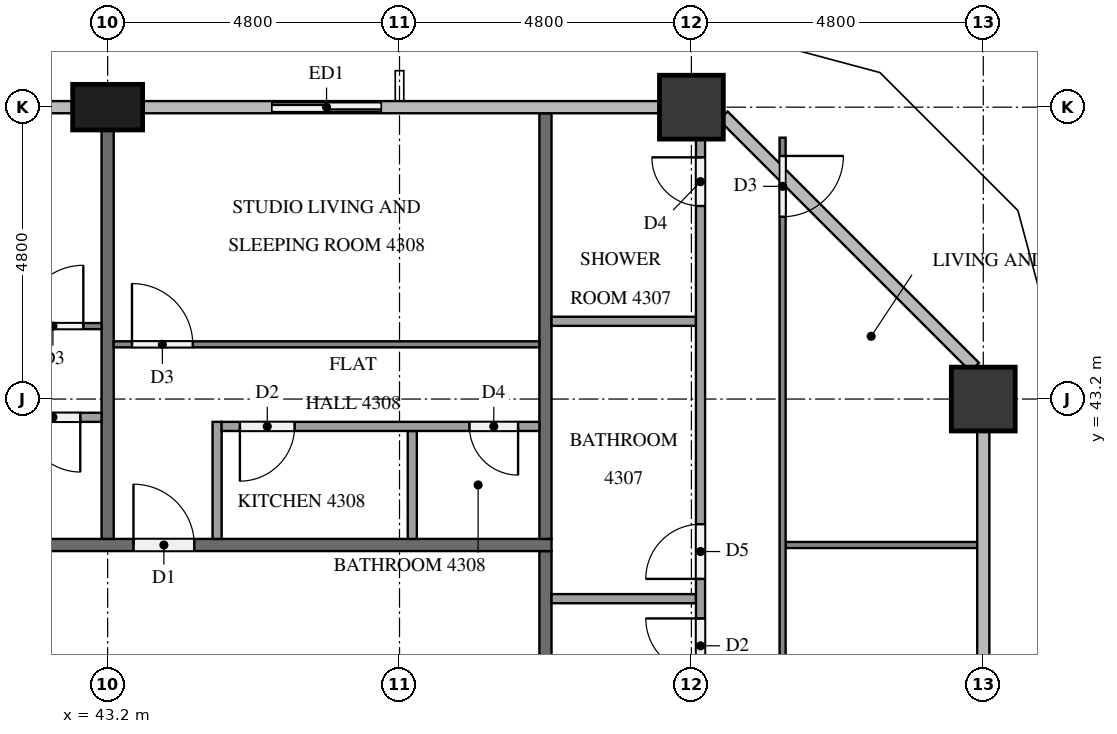
"""IFC4 building model, lengths in metres.
Left out: names, types, materials, properties, quantities, classifications, styles, units other than length and angle.
Written with IfcOpenShell. Run it as: python <this file> out.ifc"""

import sys

from ifc_helpers import new_model, si_unit, direction, frame, frame_2d, origin, origin_2d, place, context, subcontext, project, spatial, rectangle, extrude, element, fill, save


model = new_model("IFC4")
c1 = context("Model", 3, precision=1e-05, world=origin(), true_north=direction((0.0, 1.0)))
c2 = subcontext(c1, "Body", "Model", "MODEL_VIEW")
j1 = project(units=[si_unit("LENGTHUNIT", "METRE"), si_unit("PLANEANGLEUNIT", "RADIAN")], contexts=[c1])
p1 = place(None, origin())
s1 = spatial("IfcSite", under=j1, at=p1, CompositionType="ELEMENT")
p2 = place(p1, origin())
s2 = spatial("IfcBuilding", under=s1, at=p2, CompositionType="ELEMENT")
p3 = place(p2, frame((0.0, 0.0, 166.5)))
s3 = spatial("IfcBuildingStorey", under=s2, at=p3, CompositionType="ELEMENT", Elevation=166.5)
for number, where, z_axis, x_axis in (
    (1, (57.6, 43.2, 0.0), (0.0, 0.0, 1.0), (1.0, 0.0, 0.0)),
    (2, (52.8, 48.0, 0.0), (0.0, 0.0, 1.0), (1.0, 0.0, 0.0)),
):
    element("IfcColumn", number, at=place(p3, frame(where, z_axis=z_axis, x_axis=x_axis)), inside=s3, PredefinedType="COLUMN", context=c2, shape_type="SweptSolid", body=[
        extrude(rectangle(XDim=1.05, YDim=1.05, at=origin_2d()), origin(), (0.0, 0.0, 1.0), 3.2),
    ])
p4 = place(p3, frame((43.2, 48.0, 0.0), z_axis=(0.0, 0.0, 1.0), x_axis=(1.0, 0.0, 0.0)))
e3 = element("IfcColumn", 3, at=p4, inside=s3, PredefinedType="COLUMN", context=c2, shape_type="SweptSolid", body=[
    extrude(rectangle(XDim=1.15, YDim=0.75, at=origin_2d()), origin(), (0.0, 0.0, 1.0), 3.2),
])
p5 = place(p3, frame((48.0, 48.0, 0.0), z_axis=(0.0, 0.0, 1.0), x_axis=(-1.0, 0.0, 0.0)))
e4 = element("IfcWall", 4, at=p5, inside=s3, PredefinedType="SOLIDWALL", context=c2, shape_type="SweptSolid", body=[
    extrude(rectangle(XDim=2.4, YDim=0.15, at=frame_2d((1.2, 0.0))), origin(), (0.0, 0.0, 1.0), 3.2),
])
p6 = place(p5, frame((0.3, 0.0, 0.0)))
e5 = element("IfcOpeningElement", 5, at=p6, cuts=e4, PredefinedType="OPENING", context=c2, shape_type="SweptSolid", body=[
    extrude(rectangle(XDim=1.8, YDim=2.4, at=frame_2d((0.9, 1.2))), frame((0.0, 0.085, 0.0), z_axis=(0.0, -1.0, 0.0), x_axis=(1.0, 0.0, 0.0)), (0.0, 0.0, 1.0), 0.17),
])
p7 = place(p3, frame((50.4, 40.7, 0.0), z_axis=(0.0, 0.0, 1.0), x_axis=(0.0, -1.0, 0.0)))
e6 = element("IfcWall", 6, at=p7, inside=s3, PredefinedType="PARTITIONING", context=c2, shape_type="SweptSolid", body=[
    extrude(rectangle(XDim=28.6, YDim=0.2, at=frame_2d((14.3, 0.0))), origin(), (0.0, 0.0, 1.0), 3.2),
])
p8 = place(p7, frame((19.525, 0.0, 0.0)))
e7 = element("IfcOpeningElement", 7, at=p8, cuts=e6, PredefinedType="OPENING", context=c2, shape_type="SweptSolid", body=[
    extrude(rectangle(XDim=1.0, YDim=2.1, at=frame_2d((0.5, 1.05))), frame((0.0, 0.11, 0.0), z_axis=(0.0, -1.0, 0.0), x_axis=(1.0, 0.0, 0.0)), (0.0, 0.0, 1.0), 0.22),
])
p9 = place(p7, frame((17.675, 0.0, 0.0)))
e8 = element("IfcOpeningElement", 8, at=p9, cuts=e6, PredefinedType="OPENING", context=c2, shape_type="SweptSolid", body=[
    extrude(rectangle(XDim=1.0, YDim=2.1, at=frame_2d((0.5, 1.05))), frame((0.0, 0.11, 0.0), z_axis=(0.0, -1.0, 0.0), x_axis=(1.0, 0.0, 0.0)), (0.0, 0.0, 1.0), 0.22),
])
p10 = place(p7, frame((8.075, 0.0, 0.0)))
e9 = element("IfcOpeningElement", 9, at=p10, cuts=e6, PredefinedType="OPENING", context=c2, shape_type="SweptSolid", body=[
    extrude(rectangle(XDim=1.0, YDim=2.1, at=frame_2d((0.5, 1.05))), frame((0.0, 0.11, 0.0), z_axis=(0.0, -1.0, 0.0), x_axis=(1.0, 0.0, 0.0)), (0.0, 0.0, 1.0), 0.22),
])
p11 = place(p3, frame((11.9, 40.8, 0.0), z_axis=(0.0, 0.0, 1.0), x_axis=(1.0, 0.0, 0.0)))
e10 = element("IfcWall", 10, at=p11, inside=s3, PredefinedType="PARTITIONING", context=c2, shape_type="SweptSolid", body=[
    extrude(rectangle(XDim=38.6, YDim=0.2, at=frame_2d((19.3, 0.0))), origin(), (0.0, 0.0, 1.0), 3.2),
])
p12 = place(p11, frame((31.725, 0.0, 0.0)))
e11 = element("IfcOpeningElement", 11, at=p12, cuts=e10, PredefinedType="OPENING", context=c2, shape_type="SweptSolid", body=[
    extrude(rectangle(XDim=1.0, YDim=2.1, at=frame_2d((0.5, 1.05))), frame((0.0, 0.11, 0.0), z_axis=(0.0, -1.0, 0.0), x_axis=(1.0, 0.0, 0.0)), (0.0, 0.0, 1.0), 0.22),
])
p13 = place(p11, frame((17.325, 0.0, 0.0)))
e12 = element("IfcOpeningElement", 12, at=p13, cuts=e10, PredefinedType="OPENING", context=c2, shape_type="SweptSolid", body=[
    extrude(rectangle(XDim=1.0, YDim=2.1, at=frame_2d((0.5, 1.05))), frame((0.0, 0.11, 0.0), z_axis=(0.0, -1.0, 0.0), x_axis=(1.0, 0.0, 0.0)), (0.0, 0.0, 1.0), 0.22),
])
p14 = place(p11, frame((0.525, 0.0, 0.0)))
e13 = element("IfcOpeningElement", 13, at=p14, cuts=e10, PredefinedType="OPENING", context=c2, shape_type="SweptSolid", body=[
    extrude(rectangle(XDim=1.0, YDim=2.1, at=frame_2d((0.5, 1.05))), frame((0.0, 0.11, 0.0), z_axis=(0.0, -1.0, 0.0), x_axis=(1.0, 0.0, 0.0)), (0.0, 0.0, 1.0), 0.22),
])
p15 = place(p3, frame((50.4, 40.9, 0.0), z_axis=(0.0, 0.0, 1.0), x_axis=(0.0, 1.0, 0.0)))
e14 = element("IfcWall", 14, at=p15, inside=s3, PredefinedType="PARTITIONING", context=c2, shape_type="SweptSolid", body=[
    extrude(rectangle(XDim=7.0, YDim=0.2, at=frame_2d((3.5, 0.0))), origin(), (0.0, 0.0, 1.0), 3.2),
])
p16 = place(p3, frame((43.2, 47.625, 0.0), z_axis=(0.0, 0.0, 1.0), x_axis=(0.0, -1.0, 0.0)))
e15 = element("IfcWall", 15, at=p16, inside=s3, PredefinedType="PARTITIONING", context=c2, shape_type="SweptSolid", body=[
    extrude(rectangle(XDim=6.725, YDim=0.2, at=frame_2d((3.363, 0.0))), origin(), (0.0, 0.0, 1.0), 3.2),
])
p17 = place(p3, frame((54.35, 40.8, 0.0), z_axis=(0.0, 0.0, 1.0), x_axis=(1.0, 0.0, 0.0)))
e16 = element("IfcWall", 16, at=p17, inside=s3, PredefinedType="PARTITIONING", context=c2, shape_type="SweptSolid", body=[
    extrude(rectangle(XDim=3.15, YDim=0.1, at=frame_2d((1.575, 0.0))), origin(), (0.0, 0.0, 1.0), 3.2),
])
p18 = place(p3, frame((54.3, 47.498, 0.0), z_axis=(0.0, 0.0, 1.0), x_axis=(0.0, -1.0, 0.0)))
e17 = element("IfcWall", 17, at=p18, inside=s3, PredefinedType="PARTITIONING", context=c2, shape_type="SweptSolid", body=[
    extrude(rectangle(XDim=16.198, YDim=0.1, at=frame_2d((8.099, 0.0))), origin(), (0.0, 0.0, 1.0), 3.2),
])
p19 = place(p18, frame((11.848, 0.0, 0.0)))
e18 = element("IfcOpeningElement", 18, at=p19, cuts=e17, PredefinedType="OPENING", context=c2, shape_type="SweptSolid", body=[
    extrude(rectangle(XDim=0.9, YDim=2.1, at=frame_2d((0.45, 1.05))), frame((0.0, 0.06, 0.0), z_axis=(0.0, -1.0, 0.0), x_axis=(1.0, 0.0, 0.0)), (0.0, 0.0, 1.0), 0.12),
])
p20 = place(p18, frame((10.248, 0.0, 0.0)))
e19 = element("IfcOpeningElement", 19, at=p20, cuts=e17, PredefinedType="OPENING", context=c2, shape_type="SweptSolid", body=[
    extrude(rectangle(XDim=0.9, YDim=2.1, at=frame_2d((0.45, 1.05))), frame((0.0, 0.06, 0.0), z_axis=(0.0, -1.0, 0.0), x_axis=(1.0, 0.0, 0.0)), (0.0, 0.0, 1.0), 0.12),
])
p21 = place(p18, frame((0.3, 0.0, 0.0)))
e20 = element("IfcOpeningElement", 20, at=p21, cuts=e17, PredefinedType="OPENING", context=c2, shape_type="SweptSolid", body=[
    extrude(rectangle(XDim=1.0, YDim=2.1, at=frame_2d((0.5, 1.05))), frame((0.0, 0.06, 0.0), z_axis=(0.0, -1.0, 0.0), x_axis=(1.0, 0.0, 0.0)), (0.0, 0.0, 1.0), 0.12),
])
for number, where, z_axis, x_axis in (
    (21, (50.5, 39.917, 0.0), (0.0, 0.0, 1.0), (1.0, 0.0, 0.0)),
    (22, (50.5, 44.479, 0.0), (0.0, 0.0, 1.0), (1.0, 0.0, 0.0)),
):
    element("IfcWall", number, at=place(p3, frame(where, z_axis=z_axis, x_axis=x_axis)), inside=s3, PredefinedType="PARTITIONING", context=c2, shape_type="SweptSolid", body=[
        extrude(rectangle(XDim=2.375, YDim=0.15, at=frame_2d((1.188, 0.0))), origin(), (0.0, 0.0, 1.0), 3.2),
    ])
p22 = place(p3, frame((52.95, 33.075, 0.0), z_axis=(0.0, 0.0, 1.0), x_axis=(0.0, 1.0, 0.0)))
e23 = element("IfcWall", 23, at=p22, inside=s3, PredefinedType="PARTITIONING", context=c2, shape_type="SweptSolid", body=[
    extrude(rectangle(XDim=14.4, YDim=0.15, at=frame_2d((7.2, 0.0))), origin(), (0.0, 0.0, 1.0), 3.2),
])
p23 = place(p22, frame((5.617, 0.0, 0.0)))
e24 = element("IfcOpeningElement", 24, at=p23, cuts=e23, PredefinedType="OPENING", context=c2, shape_type="SweptSolid", body=[
    extrude(rectangle(XDim=0.9, YDim=2.1, at=frame_2d((0.45, 1.05))), frame((0.0, 0.085, 0.0), z_axis=(0.0, -1.0, 0.0), x_axis=(1.0, 0.0, 0.0)), (0.0, 0.0, 1.0), 0.17),
])
p24 = place(p22, frame((7.167, 0.0, 0.0)))
e25 = element("IfcOpeningElement", 25, at=p24, cuts=e23, PredefinedType="OPENING", context=c2, shape_type="SweptSolid", body=[
    extrude(rectangle(XDim=0.9, YDim=2.1, at=frame_2d((0.45, 1.05))), frame((0.0, 0.085, 0.0), z_axis=(0.0, -1.0, 0.0), x_axis=(1.0, 0.0, 0.0)), (0.0, 0.0, 1.0), 0.17),
])
p25 = place(p22, frame((13.3, 0.0, 0.0)))
e26 = element("IfcOpeningElement", 26, at=p25, cuts=e23, PredefinedType="OPENING", context=c2, shape_type="SweptSolid", body=[
    extrude(rectangle(XDim=0.8, YDim=2.1, at=frame_2d((0.4, 1.05))), frame((0.0, 0.085, 0.0), z_axis=(0.0, -1.0, 0.0), x_axis=(1.0, 0.0, 0.0)), (0.0, 0.0, 1.0), 0.17),
])
p26 = place(p3, frame((43.3, 44.1, 0.0), z_axis=(0.0, 0.0, 1.0), x_axis=(1.0, 0.0, 0.0)))
e27 = element("IfcWall", 27, at=p26, inside=s3, PredefinedType="PARTITIONING", context=c2, shape_type="SweptSolid", body=[
    extrude(rectangle(XDim=7.0, YDim=0.1, at=frame_2d((3.5, 0.0))), origin(), (0.0, 0.0, 1.0), 3.2),
])
p27 = place(p26, frame((0.3, 0.0, 0.0)))
e28 = element("IfcOpeningElement", 28, at=p27, cuts=e27, PredefinedType="OPENING", context=c2, shape_type="SweptSolid", body=[
    extrude(rectangle(XDim=1.0, YDim=2.1, at=frame_2d((0.5, 1.05))), frame((0.0, 0.06, 0.0), z_axis=(0.0, -1.0, 0.0), x_axis=(1.0, 0.0, 0.0)), (0.0, 0.0, 1.0), 0.12),
])
p28 = place(p3, frame((48.21, 40.9, 0.0), z_axis=(0.0, 0.0, 1.0), x_axis=(0.0, 1.0, 0.0)))
e29 = element("IfcWall", 29, at=p28, inside=s3, PredefinedType="PARTITIONING", context=c2, shape_type="SweptSolid", body=[
    extrude(rectangle(XDim=1.775, YDim=0.15, at=frame_2d((0.888, 0.0))), origin(), (0.0, 0.0, 1.0), 3.2),
])
p29 = place(p3, frame((45.0, 40.9, 0.0), z_axis=(0.0, 0.0, 1.0), x_axis=(0.0, 1.0, 0.0)))
e30 = element("IfcWall", 30, at=p29, inside=s3, PredefinedType="PARTITIONING", context=c2, shape_type="SweptSolid", body=[
    extrude(rectangle(XDim=1.925, YDim=0.15, at=frame_2d((0.962, 0.0))), origin(), (0.0, 0.0, 1.0), 3.2),
])
p30 = place(p3, frame((50.3, 42.75, 0.0), z_axis=(0.0, 0.0, 1.0), x_axis=(-1.0, 0.0, 0.0)))
e31 = element("IfcWall", 31, at=p30, inside=s3, PredefinedType="PARTITIONING", context=c2, shape_type="SweptSolid", body=[
    extrude(rectangle(XDim=5.225, YDim=0.15, at=frame_2d((2.613, 0.0))), origin(), (0.0, 0.0, 1.0), 3.2),
])
p31 = place(p30, frame((4.025, 0.0, 0.0)))
e32 = element("IfcOpeningElement", 32, at=p31, cuts=e31, PredefinedType="OPENING", context=c2, shape_type="SweptSolid", body=[
    extrude(rectangle(XDim=0.9, YDim=2.1, at=frame_2d((0.45, 1.05))), frame((0.0, 0.085, 0.0), z_axis=(0.0, -1.0, 0.0), x_axis=(1.0, 0.0, 0.0)), (0.0, 0.0, 1.0), 0.17),
])
p32 = place(p30, frame((0.35, 0.0, 0.0)))
e33 = element("IfcOpeningElement", 33, at=p32, cuts=e31, PredefinedType="OPENING", context=c2, shape_type="SweptSolid", body=[
    extrude(rectangle(XDim=0.8, YDim=2.1, at=frame_2d((0.4, 1.05))), frame((0.0, 0.085, 0.0), z_axis=(0.0, -1.0, 0.0), x_axis=(1.0, 0.0, 0.0)), (0.0, 0.0, 1.0), 0.17),
])
p33 = place(p3, frame((28.9, 44.4, 0.0), z_axis=(0.0, 0.0, 1.0), x_axis=(1.0, 0.0, 0.0)))
e34 = element("IfcWall", 34, at=p33, inside=s3, PredefinedType="PARTITIONING", context=c2, shape_type="SweptSolid", body=[
    extrude(rectangle(XDim=14.2, YDim=0.1, at=frame_2d((7.1, 0.0))), origin(), (0.0, 0.0, 1.0), 3.2),
])
p34 = place(p33, frame((3.45, 0.0, 0.0)))
e35 = element("IfcOpeningElement", 35, at=p34, cuts=e34, PredefinedType="OPENING", context=c2, shape_type="SweptSolid", body=[
    extrude(rectangle(XDim=0.9, YDim=2.1, at=frame_2d((0.45, 1.05))), frame((0.0, 0.06, 0.0), z_axis=(0.0, -1.0, 0.0), x_axis=(1.0, 0.0, 0.0)), (0.0, 0.0, 1.0), 0.12),
])
p35 = place(p33, frame((5.05, 0.0, 0.0)))
e36 = element("IfcOpeningElement", 36, at=p35, cuts=e34, PredefinedType="OPENING", context=c2, shape_type="SweptSolid", body=[
    extrude(rectangle(XDim=0.9, YDim=2.1, at=frame_2d((0.45, 1.05))), frame((0.0, 0.06, 0.0), z_axis=(0.0, -1.0, 0.0), x_axis=(1.0, 0.0, 0.0)), (0.0, 0.0, 1.0), 0.12),
])
p36 = place(p33, frame((12.9, 0.0, 0.0)))
e37 = element("IfcOpeningElement", 37, at=p36, cuts=e34, PredefinedType="OPENING", context=c2, shape_type="SweptSolid", body=[
    extrude(rectangle(XDim=1.0, YDim=2.1, at=frame_2d((0.5, 1.05))), frame((0.0, 0.06, 0.0), z_axis=(0.0, -1.0, 0.0), x_axis=(1.0, 0.0, 0.0)), (0.0, 0.0, 1.0), 0.12),
])
p37 = place(p3, frame((43.1, 42.9, 0.0), z_axis=(0.0, 0.0, 1.0), x_axis=(-1.0, 0.0, 0.0)))
e38 = element("IfcWall", 38, at=p37, inside=s3, PredefinedType="PARTITIONING", context=c2, shape_type="SweptSolid", body=[
    extrude(rectangle(XDim=12.425, YDim=0.15, at=frame_2d((6.212, 0.0))), origin(), (0.0, 0.0, 1.0), 3.2),
])
p38 = place(p37, frame((7.015, 0.0, 0.0)))
e39 = element("IfcOpeningElement", 39, at=p38, cuts=e38, PredefinedType="OPENING", context=c2, shape_type="SweptSolid", body=[
    extrude(rectangle(XDim=0.9, YDim=2.1, at=frame_2d((0.45, 1.05))), frame((0.0, 0.085, 0.0), z_axis=(0.0, -1.0, 0.0), x_axis=(1.0, 0.0, 0.0)), (0.0, 0.0, 1.0), 0.17),
])
p39 = place(p37, frame((5.565, 0.0, 0.0)))
e40 = element("IfcOpeningElement", 40, at=p39, cuts=e38, PredefinedType="OPENING", context=c2, shape_type="SweptSolid", body=[
    extrude(rectangle(XDim=0.8, YDim=2.1, at=frame_2d((0.4, 1.05))), frame((0.0, 0.085, 0.0), z_axis=(0.0, -1.0, 0.0), x_axis=(1.0, 0.0, 0.0)), (0.0, 0.0, 1.0), 0.17),
])
p40 = place(p37, frame((0.35, 0.0, 0.0)))
e41 = element("IfcOpeningElement", 41, at=p40, cuts=e38, PredefinedType="OPENING", context=c2, shape_type="SweptSolid", body=[
    extrude(rectangle(XDim=0.9, YDim=2.1, at=frame_2d((0.45, 1.05))), frame((0.0, 0.085, 0.0), z_axis=(0.0, -1.0, 0.0), x_axis=(1.0, 0.0, 0.0)), (0.0, 0.0, 1.0), 0.17),
])
p41 = place(p6, origin())
e42 = element("IfcDoor", 42, at=p41, inside=s3, OperationType="SLIDING_TO_LEFT", PredefinedType="DOOR", context=c2, shape_type="SweptSolid", body=[
    extrude(rectangle(XDim=1.8, YDim=2.4, at=frame_2d((0.9, 1.2))), frame((0.0, 0.025, 0.0), z_axis=(0.0, -1.0, 0.0), x_axis=(1.0, 0.0, 0.0)), (0.0, 0.0, 1.0), 0.05),
])
fill(e5, e42)
p42 = place(p12, origin())
e43 = element("IfcDoor", 43, at=p42, inside=s3, OperationType="SINGLE_SWING_LEFT", PredefinedType="DOOR", context=c2, shape_type="SweptSolid", body=[
    extrude(rectangle(XDim=1.0, YDim=2.1, at=frame_2d((0.5, 1.05))), frame((0.0, 0.025, 0.0), z_axis=(0.0, -1.0, 0.0), x_axis=(1.0, 0.0, 0.0)), (0.0, 0.0, 1.0), 0.05),
])
fill(e11, e43)
p43 = place(p21, origin())
e44 = element("IfcDoor", 44, at=p43, inside=s3, OperationType="SINGLE_SWING_LEFT", PredefinedType="DOOR", context=c2, shape_type="SweptSolid", body=[
    extrude(rectangle(XDim=1.0, YDim=2.1, at=frame_2d((0.5, 1.05))), frame((0.0, 0.025, 0.0), z_axis=(0.0, -1.0, 0.0), x_axis=(1.0, 0.0, 0.0)), (0.0, 0.0, 1.0), 0.05),
])
fill(e20, e44)
p44 = place(p23, origin())
e45 = element("IfcDoor", 45, at=p44, inside=s3, OperationType="SINGLE_SWING_RIGHT", PredefinedType="DOOR", context=c2, shape_type="SweptSolid", body=[
    extrude(rectangle(XDim=0.9, YDim=2.1, at=frame_2d((0.45, 1.05))), frame((0.0, 0.025, 0.0), z_axis=(0.0, -1.0, 0.0), x_axis=(1.0, 0.0, 0.0)), (0.0, 0.0, 1.0), 0.05),
])
fill(e24, e45)
p45 = place(p24, origin())
e46 = element("IfcDoor", 46, at=p45, inside=s3, OperationType="SINGLE_SWING_LEFT", PredefinedType="DOOR", context=c2, shape_type="SweptSolid", body=[
    extrude(rectangle(XDim=0.9, YDim=2.1, at=frame_2d((0.45, 1.05))), frame((0.0, 0.025, 0.0), z_axis=(0.0, -1.0, 0.0), x_axis=(1.0, 0.0, 0.0)), (0.0, 0.0, 1.0), 0.05),
])
fill(e25, e46)
p46 = place(p25, origin())
e47 = element("IfcDoor", 47, at=p46, inside=s3, OperationType="SINGLE_SWING_RIGHT", PredefinedType="DOOR", context=c2, shape_type="SweptSolid", body=[
    extrude(rectangle(XDim=0.8, YDim=2.1, at=frame_2d((0.4, 1.05))), frame((0.0, 0.025, 0.0), z_axis=(0.0, -1.0, 0.0), x_axis=(1.0, 0.0, 0.0)), (0.0, 0.0, 1.0), 0.05),
])
fill(e26, e47)
p47 = place(p27, origin())
e48 = element("IfcDoor", 48, at=p47, inside=s3, OperationType="SINGLE_SWING_LEFT", PredefinedType="DOOR", context=c2, shape_type="SweptSolid", body=[
    extrude(rectangle(XDim=1.0, YDim=2.1, at=frame_2d((0.5, 1.05))), frame((0.0, 0.025, 0.0), z_axis=(0.0, -1.0, 0.0), x_axis=(1.0, 0.0, 0.0)), (0.0, 0.0, 1.0), 0.05),
])
fill(e28, e48)
p48 = place(p31, origin())
e49 = element("IfcDoor", 49, at=p48, inside=s3, OperationType="SINGLE_SWING_RIGHT", PredefinedType="DOOR", context=c2, shape_type="SweptSolid", body=[
    extrude(rectangle(XDim=0.9, YDim=2.1, at=frame_2d((0.45, 1.05))), frame((0.0, 0.025, 0.0), z_axis=(0.0, -1.0, 0.0), x_axis=(1.0, 0.0, 0.0)), (0.0, 0.0, 1.0), 0.05),
])
fill(e32, e49)
p49 = place(p32, origin())
e50 = element("IfcDoor", 50, at=p49, inside=s3, OperationType="SINGLE_SWING_LEFT", PredefinedType="DOOR", context=c2, shape_type="SweptSolid", body=[
    extrude(rectangle(XDim=0.8, YDim=2.1, at=frame_2d((0.4, 1.05))), frame((0.0, 0.025, 0.0), z_axis=(0.0, -1.0, 0.0), x_axis=(1.0, 0.0, 0.0)), (0.0, 0.0, 1.0), 0.05),
])
fill(e33, e50)
p50 = place(p36, origin())
e51 = element("IfcDoor", 51, at=p50, inside=s3, OperationType="SINGLE_SWING_RIGHT", PredefinedType="DOOR", context=c2, shape_type="SweptSolid", body=[
    extrude(rectangle(XDim=1.0, YDim=2.1, at=frame_2d((0.5, 1.05))), frame((0.0, 0.025, 0.0), z_axis=(0.0, -1.0, 0.0), x_axis=(1.0, 0.0, 0.0)), (0.0, 0.0, 1.0), 0.05),
])
fill(e37, e51)
p51 = place(p40, origin())
e52 = element("IfcDoor", 52, at=p51, inside=s3, OperationType="SINGLE_SWING_LEFT", PredefinedType="DOOR", context=c2, shape_type="SweptSolid", body=[
    extrude(rectangle(XDim=0.9, YDim=2.1, at=frame_2d((0.45, 1.05))), frame((0.0, 0.025, 0.0), z_axis=(0.0, -1.0, 0.0), x_axis=(1.0, 0.0, 0.0)), (0.0, 0.0, 1.0), 0.05),
])
fill(e41, e52)
save(model, sys.argv[1])
